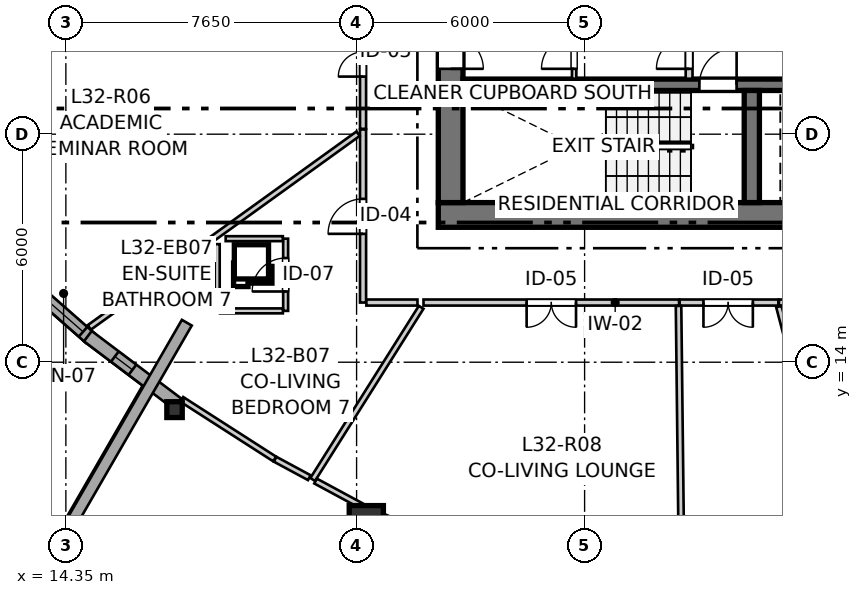
"""IFC4 building model, lengths in metres.
Left out: names, types, materials, properties, quantities, classifications, styles, units other than length and angle.
Written with IfcOpenShell. Run it as: python <this file> out.ifc"""

import sys

from ifc_helpers import new_model, si_unit, direction, frame, frame_2d, origin, origin_2d, place, context, subcontext, project, spatial, rectangle, i_section, extrude, source, transform, mapped, element, fill, save


model = new_model("IFC4")
c1 = context("Model", 3, precision=1e-05, world=origin(), true_north=direction((0.0, 1.0)))
c2 = subcontext(c1, "Body", "Model", "MODEL_VIEW")
j1 = project(units=[si_unit("LENGTHUNIT", "METRE"), si_unit("PLANEANGLEUNIT", "RADIAN")], contexts=[c1])
p1 = place(None, origin())
s1 = spatial("IfcSite", under=j1, at=p1, CompositionType="ELEMENT")
p2 = place(p1, origin())
s2 = spatial("IfcBuilding", under=s1, at=p2, CompositionType="ELEMENT")
p3 = place(p2, frame((0.0, 0.0, 108.8)))
s3 = spatial("IfcBuildingStorey", under=s2, at=p3, CompositionType="ELEMENT", Elevation=108.8)
p4 = place(p3, frame((24.15, 17.875, 0.0), z_axis=(0.0, 0.0, 1.0), x_axis=(1.0, 0.0, 0.0)))
e1 = element("IfcWall", 1, at=p4, inside=s3, PredefinedType="SHEAR", context=c2, shape_type="SweptSolid", body=[
    extrude(rectangle(XDim=12.4, YDim=0.65, at=frame_2d((6.2, 0.0))), origin(), (0.0, 0.0, 1.0), 2.935),
])
p5 = place(p3, frame((24.475, 33.8, 0.0), z_axis=(0.0, 0.0, 1.0), x_axis=(0.0, -1.0, 0.0)))
e2 = element("IfcWall", 2, at=p5, inside=s3, PredefinedType="SHEAR", context=c2, shape_type="SweptSolid", body=[
    extrude(rectangle(XDim=15.6, YDim=0.65, at=frame_2d((7.8, 0.0))), origin(), (0.0, 0.0, 1.0), 2.935),
])
p6 = place(p5, frame((7.05, 0.0, 0.0)))
e3 = element("IfcOpeningElement", 3, at=p6, cuts=e2, PredefinedType="OPENING", context=c2, shape_type="SweptSolid", body=[
    extrude(rectangle(XDim=1.5, YDim=2.15, at=frame_2d((0.75, 1.075))), frame((0.0, 0.335, 0.0), z_axis=(0.0, -1.0, 0.0), x_axis=(1.0, 0.0, 0.0)), (0.0, 0.0, 1.0), 0.67),
])
p7 = place(p5, frame((3.52, 0.0, 0.0)))
e4 = element("IfcOpeningElement", 4, at=p7, cuts=e2, PredefinedType="OPENING", context=c2, shape_type="SweptSolid", body=[
    extrude(rectangle(XDim=0.86, YDim=2.05, at=frame_2d((0.43, 1.025))), frame((0.0, 0.335, 0.0), z_axis=(0.0, -1.0, 0.0), x_axis=(1.0, 0.0, 0.0)), (0.0, 0.0, 1.0), 0.67),
])
p8 = place(p5, frame((11.22, 0.0, 0.0)))
e5 = element("IfcOpeningElement", 5, at=p8, cuts=e2, PredefinedType="OPENING", context=c2, shape_type="SweptSolid", body=[
    extrude(rectangle(XDim=0.86, YDim=2.05, at=frame_2d((0.43, 1.025))), frame((0.0, 0.335, 0.0), z_axis=(0.0, -1.0, 0.0), x_axis=(1.0, 0.0, 0.0)), (0.0, 0.0, 1.0), 0.67),
])
p9 = place(p3, frame((24.8, 21.3, 0.0), z_axis=(0.0, 0.0, 1.0), x_axis=(1.0, 0.0, 0.0)))
e6 = element("IfcWall", 6, at=p9, inside=s3, PredefinedType="SHEAR", context=c2, shape_type="SweptSolid", body=[
    extrude(rectangle(XDim=11.1, YDim=0.3, at=frame_2d((5.55, 0.0))), origin(), (0.0, 0.0, 1.0), 2.935),
])
p10 = place(p9, frame((6.22, 0.0, 0.0)))
e7 = element("IfcOpeningElement", 7, at=p10, cuts=e6, PredefinedType="OPENING", context=c2, shape_type="SweptSolid", body=[
    extrude(rectangle(XDim=0.98, YDim=2.15, at=frame_2d((0.49, 1.075))), frame((0.0, 0.16, 0.0), z_axis=(0.0, -1.0, 0.0), x_axis=(1.0, 0.0, 0.0)), (0.0, 0.0, 1.0), 0.32),
])
p11 = place(p9, frame((9.15, 0.0, 0.0)))
e8 = element("IfcOpeningElement", 8, at=p11, cuts=e6, PredefinedType="OPENING", context=c2, shape_type="SweptSolid", body=[
    extrude(rectangle(XDim=1.15, YDim=2.15, at=frame_2d((0.575, 1.075))), frame((0.0, 0.16, 0.0), z_axis=(0.0, -1.0, 0.0), x_axis=(1.0, 0.0, 0.0)), (0.0, 0.0, 1.0), 0.32),
])
p12 = place(p3, frame((32.4, 18.2, 0.0), z_axis=(0.0, 0.0, 1.0), x_axis=(0.0, 1.0, 0.0)))
e9 = element("IfcWall", 9, at=p12, inside=s3, PredefinedType="SHEAR", context=c2, shape_type="SweptSolid", body=[
    extrude(rectangle(XDim=2.95, YDim=0.4, at=frame_2d((1.475, 0.0))), origin(), (0.0, 0.0, 1.0), 2.935),
])
m1 = source(origin(), c2, "Body", "SweptSolid", [
    extrude(i_section(OverallWidth=0.406, OverallDepth=0.416, WebThickness=0.027, FlangeThickness=0.044, FilletRadius=0.015, at=origin_2d()), origin(), (0.0, 0.0, 1.0), 2.935),
])
p13 = place(p3, frame((17.209, 12.753, 0.0), z_axis=(0.0, 0.0, 1.0), x_axis=(1.0, 0.0, 0.0)))
e10 = element("IfcColumn", 10, at=p13, inside=s3, PredefinedType="PILASTER", context=c2, shape_type="MappedRepresentation", body=[
    mapped(m1, transform((0.0, 0.0, 0.0), x_axis=(1.0, 0.0, 0.0), y_axis=(0.0, 1.0, 0.0), z_axis=(0.0, 0.0, 1.0), scale=1.0)),
])
m2 = source(origin(), c2, "Body", "SweptSolid", [
    extrude(rectangle(XDim=0.9, YDim=0.9, at=origin_2d()), origin(), (0.0, 0.0, 1.0), 2.935),
])
p14 = place(p3, frame((22.256, 9.778, 0.0), z_axis=(0.0, 0.0, 1.0), x_axis=(1.0, 0.0, 0.0)))
e11 = element("IfcColumn", 11, at=p14, inside=s3, PredefinedType="COLUMN", context=c2, shape_type="MappedRepresentation", body=[
    mapped(m2, transform((0.0, 0.0, 0.0), x_axis=(1.0, 0.0, 0.0), y_axis=(0.0, 1.0, 0.0), z_axis=(0.0, 0.0, 1.0), scale=1.0)),
])
p15 = place(p3, frame((12.901, 16.471, 0.0), z_axis=(0.0, 0.0, 1.0), x_axis=(0.751480442913, -0.659755366722, 0.0)))
e12 = element("IfcWall", 12, at=p15, inside=s3, PredefinedType="SOLIDWALL", context=c2, shape_type="SweptSolid", body=[
    extrude(rectangle(XDim=2.789, YDim=0.34, at=frame_2d((1.395, 0.0))), origin(), (0.0, 0.0, 1.0), 2.465),
])
p16 = place(p15, frame((0.43, 0.0, 0.82)))
e13 = element("IfcOpeningElement", 13, at=p16, cuts=e12, PredefinedType="OPENING", context=c2, shape_type="SweptSolid", body=[
    extrude(rectangle(XDim=2.1, YDim=1.4, at=frame_2d((1.05, 0.7))), frame((0.0, 0.18, 0.0), z_axis=(0.0, -1.0, 0.0), x_axis=(1.0, 0.0, 0.0)), (0.0, 0.0, 1.0), 0.36),
])
p17 = place(p3, frame((14.928, 14.686, 0.0), z_axis=(0.0, 0.0, 1.0), x_axis=(0.798387010211, -0.602144651995, 0.0)))
e14 = element("IfcWall", 14, at=p17, inside=s3, PredefinedType="SOLIDWALL", context=c2, shape_type="SweptSolid", body=[
    extrude(rectangle(XDim=2.966, YDim=0.34, at=frame_2d((1.483, 0.0))), origin(), (0.0, 0.0, 1.0), 2.465),
])
p18 = place(p17, frame((0.891, 0.0, 0.82)))
e15 = element("IfcOpeningElement", 15, at=p18, cuts=e14, PredefinedType="OPENING", context=c2, shape_type="SweptSolid", body=[
    extrude(rectangle(XDim=0.58, YDim=1.35, at=frame_2d((0.29, 0.675))), frame((0.0, 0.18, 0.0), z_axis=(0.0, -1.0, 0.0), x_axis=(1.0, 0.0, 0.0)), (0.0, 0.0, 1.0), 0.36),
])
p19 = place(p3, frame((17.533, 15.04, 0.0), z_axis=(0.0, 0.0, 1.0), x_axis=(-0.499995950774, -0.866027741594, 0.0)))
e16 = element("IfcWall", 16, at=p19, inside=s3, PredefinedType="SOLIDWALL", context=c2, shape_type="SweptSolid", body=[
    extrude(rectangle(XDim=20.091, YDim=0.3, at=frame_2d((10.045, 0.0))), origin(), (0.0, 0.0, 1.0), 2.115),
])
p20 = place(p3, frame((30.75, 21.46, 0.0), z_axis=(0.0, 0.0, 1.0), x_axis=(0.0, 1.0, 0.0)))
e17 = element("IfcWall", 17, at=p20, inside=s3, PredefinedType="PARTITIONING", context=c2, shape_type="SweptSolid", body=[
    extrude(rectangle(XDim=3.11, YDim=0.18, at=frame_2d((1.555, 0.0))), origin(), (0.0, 0.0, 1.0), 2.935),
])
p21 = place(p20, frame((0.26, 0.0, 0.0)))
e18 = element("IfcOpeningElement", 18, at=p21, cuts=e17, PredefinedType="OPENING", context=c2, shape_type="SweptSolid", body=[
    extrude(rectangle(XDim=0.86, YDim=2.05, at=frame_2d((0.43, 1.025))), frame((0.0, 0.1, 0.0), z_axis=(0.0, -1.0, 0.0), x_axis=(1.0, 0.0, 0.0)), (0.0, 0.0, 1.0), 0.2),
])
p22 = place(p3, frame((27.725, 21.46, 0.0), z_axis=(0.0, 0.0, 1.0), x_axis=(0.0, 1.0, 0.0)))
e19 = element("IfcWall", 19, at=p22, inside=s3, PredefinedType="PARTITIONING", context=c2, shape_type="SweptSolid", body=[
    extrude(rectangle(XDim=1.38, YDim=0.115, at=frame_2d((0.69, 0.0))), origin(), (0.0, 0.0, 1.0), 2.935),
])
p23 = place(p22, frame((0.26, 0.0, 0.0)))
e20 = element("IfcOpeningElement", 20, at=p23, cuts=e19, PredefinedType="OPENING", context=c2, shape_type="SweptSolid", body=[
    extrude(rectangle(XDim=0.86, YDim=2.05, at=frame_2d((0.43, 1.025))), frame((0.0, 0.067, 0.0), z_axis=(0.0, -1.0, 0.0), x_axis=(1.0, 0.0, 0.0)), (0.0, 0.0, 1.0), 0.135),
])
p24 = place(p3, frame((30.486, 15.57, 0.0), z_axis=(0.0, 0.0, 1.0), x_axis=(-1.0, 0.0, 0.0)))
e21 = element("IfcWall", 21, at=p24, inside=s3, PredefinedType="PARTITIONING", context=c2, shape_type="SweptSolid", body=[
    extrude(rectangle(XDim=6.725, YDim=0.16, at=frame_2d((3.363, 0.0))), origin(), (0.0, 0.0, 1.0), 2.935),
])
p25 = place(p24, frame((2.711, 0.0, 0.0)))
e22 = element("IfcOpeningElement", 22, at=p25, cuts=e21, PredefinedType="OPENING", context=c2, shape_type="SweptSolid", body=[
    extrude(rectangle(XDim=1.3, YDim=2.1, at=frame_2d((0.65, 1.05))), frame((0.0, 0.09, 0.0), z_axis=(0.0, -1.0, 0.0), x_axis=(1.0, 0.0, 0.0)), (0.0, 0.0, 1.0), 0.18),
])
p26 = place(p3, frame((22.17, 15.57, 0.0), z_axis=(0.0, 0.0, 1.0), x_axis=(0.0, 1.0, 0.0)))
e23 = element("IfcWall", 23, at=p26, inside=s3, PredefinedType="PARTITIONING", context=c2, shape_type="SweptSolid", body=[
    extrude(rectangle(XDim=4.555, YDim=0.16, at=frame_2d((2.277, 0.0))), origin(), (0.0, 0.0, 1.0), 2.935),
])
p27 = place(p26, frame((1.808, 0.0, 0.0)))
e24 = element("IfcOpeningElement", 24, at=p27, cuts=e23, PredefinedType="OPENING", context=c2, shape_type="SweptSolid", body=[
    extrude(rectangle(XDim=0.92, YDim=2.1, at=frame_2d((0.46, 1.05))), frame((0.0, 0.09, 0.0), z_axis=(0.0, -1.0, 0.0), x_axis=(1.0, 0.0, 0.0)), (0.0, 0.0, 1.0), 0.18),
])
p28 = place(p3, frame((22.17, 20.14, 0.0), z_axis=(0.0, 0.0, 1.0), x_axis=(0.0, 1.0, 0.0)))
e25 = element("IfcWall", 25, at=p28, inside=s3, PredefinedType="PARTITIONING", context=c2, shape_type="SweptSolid", body=[
    extrude(rectangle(XDim=4.01, YDim=0.16, at=frame_2d((2.005, 0.0))), origin(), (0.0, 0.0, 1.0), 2.935),
])
p29 = place(p28, frame((1.375, 0.0, 0.0)))
e26 = element("IfcOpeningElement", 26, at=p29, cuts=e25, PredefinedType="OPENING", context=c2, shape_type="SweptSolid", body=[
    extrude(rectangle(XDim=1.3, YDim=2.1, at=frame_2d((0.65, 1.05))), frame((0.0, 0.09, 0.0), z_axis=(0.0, -1.0, 0.0), x_axis=(1.0, 0.0, 0.0)), (0.0, 0.0, 1.0), 0.18),
])
p30 = place(p3, frame((25.071, 8.884, 0.0), z_axis=(0.0, 0.0, 1.0), x_axis=(-0.913404708383, 0.407052623997, 0.0)))
e27 = element("IfcWall", 27, at=p30, inside=s3, PredefinedType="PARTITIONING", context=c2, shape_type="SweptSolid", body=[
    extrude(rectangle(XDim=2.923, YDim=0.145, at=frame_2d((1.462, 0.0))), origin(), (0.0, 0.0, 1.0), 2.453),
])
p31 = place(p30, frame((0.22, 0.0, 0.0)))
e28 = element("IfcOpeningElement", 28, at=p31, cuts=e27, PredefinedType="OPENING", context=c2, shape_type="SweptSolid", body=[
    extrude(rectangle(XDim=0.96, YDim=2.1, at=frame_2d((0.48, 1.05))), frame((0.0, 0.083, 0.0), z_axis=(0.0, -1.0, 0.0), x_axis=(1.0, 0.0, 0.0)), (0.0, 0.0, 1.0), 0.165),
])
p32 = place(p3, frame((33.099, 15.57, 0.0), z_axis=(0.0, 0.0, 1.0), x_axis=(-1.0, 0.0, 0.0)))
e29 = element("IfcWall", 29, at=p32, inside=s3, PredefinedType="PARTITIONING", context=c2, shape_type="SweptSolid", body=[
    extrude(rectangle(XDim=2.598, YDim=0.16, at=frame_2d((1.299, 0.0))), origin(), (0.0, 0.0, 1.0), 2.935),
])
p33 = place(p32, frame((0.671, 0.0, 0.0)))
e30 = element("IfcOpeningElement", 30, at=p33, cuts=e29, PredefinedType="OPENING", context=c2, shape_type="SweptSolid", body=[
    extrude(rectangle(XDim=1.3, YDim=2.1, at=frame_2d((0.65, 1.05))), frame((0.0, 0.09, 0.0), z_axis=(0.0, -1.0, 0.0), x_axis=(1.0, 0.0, 0.0)), (0.0, 0.0, 1.0), 0.18),
])
p34 = place(p3, frame((35.536, 15.57, 0.0), z_axis=(0.0, 0.0, 1.0), x_axis=(-1.0, 0.0, 0.0)))
e31 = element("IfcWall", 31, at=p34, inside=s3, PredefinedType="PARTITIONING", context=c2, shape_type="SweptSolid", body=[
    extrude(rectangle(XDim=2.422, YDim=0.16, at=frame_2d((1.211, 0.0))), origin(), (0.0, 0.0, 1.0), 2.935),
])
p35 = place(p34, frame((0.75, 0.0, 0.0)))
e32 = element("IfcOpeningElement", 32, at=p35, cuts=e31, PredefinedType="OPENING", context=c2, shape_type="SweptSolid", body=[
    extrude(rectangle(XDim=0.92, YDim=2.1, at=frame_2d((0.46, 1.05))), frame((0.0, 0.09, 0.0), z_axis=(0.0, -1.0, 0.0), x_axis=(1.0, 0.0, 0.0)), (0.0, 0.0, 1.0), 0.18),
])
p36 = place(p3, frame((20.133, 15.351, 0.0), z_axis=(0.0, 0.0, 1.0), x_axis=(0.0, 1.0, 0.0)))
e33 = element("IfcWall", 33, at=p36, inside=s3, PredefinedType="PARTITIONING", context=c2, shape_type="SweptSolid", body=[
    extrude(rectangle(XDim=1.9, YDim=0.13, at=frame_2d((0.95, 0.0))), origin(), (0.0, 0.0, 1.0), 2.935),
])
p37 = place(p36, frame((0.51, 0.0, 0.0)))
e34 = element("IfcOpeningElement", 34, at=p37, cuts=e33, PredefinedType="OPENING", context=c2, shape_type="SweptSolid", body=[
    extrude(rectangle(XDim=0.88, YDim=2.05, at=frame_2d((0.44, 1.025))), frame((0.0, 0.075, 0.0), z_axis=(0.0, -1.0, 0.0), x_axis=(1.0, 0.0, 0.0)), (0.0, 0.0, 1.0), 0.15),
])
p38 = place(p3, frame((14.966, 14.915, 0.0), z_axis=(0.0, 0.0, 1.0), x_axis=(0.811310715309, 0.584615192434, 0.0)))
e35 = element("IfcWall", 35, at=p38, inside=s3, PredefinedType="PARTITIONING", context=c2, shape_type="SweptSolid", body=[
    extrude(rectangle(XDim=8.72, YDim=0.145, at=frame_2d((4.36, 0.0))), origin(), (0.0, 0.0, 1.0), 2.103),
])
p39 = place(p3, frame((30.472, 15.481, 0.0), z_axis=(0.0, 0.0, 1.0), x_axis=(0.011623708307, -0.999932442421, 0.0)))
e36 = element("IfcWall", 36, at=p39, inside=s3, PredefinedType="PARTITIONING", context=c2, shape_type="SweptSolid", body=[
    extrude(rectangle(XDim=8.317, YDim=0.145, at=frame_2d((4.159, 0.0))), origin(), (0.0, 0.0, 1.0), 2.935),
])
p40 = place(p3, frame((20.845, 10.914, 0.0), z_axis=(0.0, 0.0, 1.0), x_axis=(0.533007953382, 0.846110230189, 0.0)))
e37 = element("IfcWall", 37, at=p40, inside=s3, PredefinedType="PARTITIONING", context=c2, shape_type="SweptSolid", body=[
    extrude(rectangle(XDim=5.354, YDim=0.145, at=frame_2d((2.677, 0.0))), origin(), (0.0, 0.0, 1.0), 2.935),
])
p41 = place(p3, frame((33.112, 15.464, 0.0), z_axis=(0.0, 0.0, 1.0), x_axis=(0.253558008984, -0.967320182814, 0.0)))
e38 = element("IfcWall", 38, at=p41, inside=s3, PredefinedType="PARTITIONING", context=c2, shape_type="SweptSolid", body=[
    extrude(rectangle(XDim=4.382, YDim=0.145, at=frame_2d((2.191, 0.0))), origin(), (0.0, 0.0, 1.0), 2.935),
])
p42 = place(p3, frame((17.398, 13.024, 0.0), z_axis=(0.0, 0.0, 1.0), x_axis=(0.841590343852, -0.540116369994, 0.0)))
e39 = element("IfcWall", 39, at=p42, inside=s3, PredefinedType="PARTITIONING", context=c2, shape_type="SweptSolid", body=[
    extrude(rectangle(XDim=2.906, YDim=0.145, at=frame_2d((1.453, 0.0))), origin(), (0.0, 0.0, 1.0), 2.453),
])
p43 = place(p3, frame((18.333, 15.351, 0.0), z_axis=(0.0, 0.0, 1.0), x_axis=(0.0, 1.0, 0.0)))
e40 = element("IfcWall", 40, at=p43, inside=s3, PredefinedType="PARTITIONING", context=c2, shape_type="SweptSolid", body=[
    extrude(rectangle(XDim=1.756, YDim=0.13, at=frame_2d((0.878, 0.0))), origin(), (0.0, 0.0, 1.0), 2.935),
])
p44 = place(p3, frame((18.555, 17.251, 0.0), z_axis=(0.0, 0.0, 1.0), x_axis=(1.0, 0.0, 0.0)))
e41 = element("IfcWall", 41, at=p44, inside=s3, PredefinedType="PARTITIONING", context=c2, shape_type="SweptSolid", body=[
    extrude(rectangle(XDim=1.505, YDim=0.13, at=frame_2d((0.752, 0.0))), origin(), (0.0, 0.0, 1.0), 2.935),
])
p45 = place(p3, frame((18.406, 15.351, 0.0), z_axis=(0.0, 0.0, 1.0), x_axis=(1.0, 0.0, 0.0)))
e42 = element("IfcWall", 42, at=p45, inside=s3, PredefinedType="PARTITIONING", context=c2, shape_type="SweptSolid", body=[
    extrude(rectangle(XDim=1.654, YDim=0.13, at=frame_2d((0.827, 0.0))), origin(), (0.0, 0.0, 1.0), 2.935),
])
p46 = place(p3, frame((20.92, 10.873, 0.0), z_axis=(0.0, 0.0, 1.0), x_axis=(0.879929881444, -0.475103571595, 0.0)))
e43 = element("IfcWall", 43, at=p46, inside=s3, PredefinedType="PARTITIONING", context=c2, shape_type="SweptSolid", body=[
    extrude(rectangle(XDim=1.667, YDim=0.145, at=frame_2d((0.834, 0.0))), origin(), (0.0, 0.0, 1.0), 2.453),
])
p47 = place(p3, frame((22.258, 15.57, 0.0), z_axis=(0.0, 0.0, 1.0), x_axis=(1.0, 0.0, 0.0)))
e44 = element("IfcWall", 44, at=p47, inside=s3, PredefinedType="PARTITIONING", context=c2, shape_type="SweptSolid", body=[
    extrude(rectangle(XDim=1.344, YDim=0.16, at=frame_2d((0.672, 0.0))), origin(), (0.0, 0.0, 1.0), 2.935),
])
p48 = place(p3, frame((19.857, 11.447, 0.0), z_axis=(0.0, 0.0, 1.0), x_axis=(0.8800411893, -0.474897362738, 0.0)))
e45 = element("IfcWall", 45, at=p48, inside=s3, PredefinedType="PARTITIONING", context=c2, shape_type="SweptSolid", body=[
    extrude(rectangle(XDim=1.022, YDim=0.145, at=frame_2d((0.511, 0.0))), origin(), (0.0, 0.0, 1.0), 2.453),
])
m3 = source(origin(), c2, "Body", "SweptSolid", [
    extrude(rectangle(XDim=2.1, YDim=1.4, at=frame_2d((1.05, 0.7))), frame((0.0, 0.03, 0.0), z_axis=(0.0, -1.0, 0.0), x_axis=(1.0, 0.0, 0.0)), (0.0, 0.0, 1.0), 0.06),
])
p49 = place(p16, origin())
e46 = element("IfcWindow", 46, at=p49, inside=s3, PartitioningType="SINGLE_PANEL", PredefinedType="WINDOW", context=c2, shape_type="MappedRepresentation", body=[
    mapped(m3, transform((0.0, 0.0, 0.0), x_axis=(1.0, 0.0, 0.0), y_axis=(0.0, 1.0, 0.0), z_axis=(0.0, 0.0, 1.0), scale=1.0)),
])
fill(e13, e46)
m4 = source(origin(), c2, "Body", "SweptSolid", [
    extrude(rectangle(XDim=0.58, YDim=1.35, at=frame_2d((0.29, 0.675))), frame((0.0, 0.03, 0.0), z_axis=(0.0, -1.0, 0.0), x_axis=(1.0, 0.0, 0.0)), (0.0, 0.0, 1.0), 0.06),
])
p50 = place(p18, origin())
e47 = element("IfcWindow", 47, at=p50, inside=s3, PartitioningType="SINGLE_PANEL", PredefinedType="WINDOW", context=c2, shape_type="MappedRepresentation", body=[
    mapped(m4, transform((0.0, 0.0, 0.0), x_axis=(1.0, 0.0, 0.0), y_axis=(0.0, 1.0, 0.0), z_axis=(0.0, 0.0, 1.0), scale=1.0)),
])
fill(e15, e47)
m5 = source(origin(), c2, "Body", "SweptSolid", [
    extrude(rectangle(XDim=0.98, YDim=2.15, at=frame_2d((0.49, 1.075))), frame((0.0, 0.025, 0.0), z_axis=(0.0, -1.0, 0.0), x_axis=(1.0, 0.0, 0.0)), (0.0, 0.0, 1.0), 0.05),
])
p51 = place(p10, origin())
e48 = element("IfcDoor", 48, at=p51, inside=s3, OperationType="SINGLE_SWING_RIGHT", PredefinedType="DOOR", context=c2, shape_type="MappedRepresentation", body=[
    mapped(m5, transform((0.0, 0.0, 0.0), x_axis=(1.0, 0.0, 0.0), y_axis=(0.0, 1.0, 0.0), z_axis=(0.0, 0.0, 1.0), scale=1.0)),
])
fill(e7, e48)
m6 = source(origin(), c2, "Body", "SweptSolid", [
    extrude(rectangle(XDim=0.86, YDim=2.05, at=frame_2d((0.43, 1.025))), frame((0.0, 0.025, 0.0), z_axis=(0.0, -1.0, 0.0), x_axis=(1.0, 0.0, 0.0)), (0.0, 0.0, 1.0), 0.05),
])
p52 = place(p8, origin())
e49 = element("IfcDoor", 49, at=p52, inside=s3, OperationType="SINGLE_SWING_RIGHT", PredefinedType="DOOR", context=c2, shape_type="MappedRepresentation", body=[
    mapped(m6, transform((0.0, 0.0, 0.0), x_axis=(1.0, 0.0, 0.0), y_axis=(0.0, 1.0, 0.0), z_axis=(0.0, 0.0, 1.0), scale=1.0)),
])
fill(e5, e49)
p53 = place(p21, origin())
e50 = element("IfcDoor", 50, at=p53, inside=s3, OperationType="SINGLE_SWING_LEFT", PredefinedType="DOOR", context=c2, shape_type="MappedRepresentation", body=[
    mapped(m6, transform((0.0, 0.0, 0.0), x_axis=(1.0, 0.0, 0.0), y_axis=(0.0, 1.0, 0.0), z_axis=(0.0, 0.0, 1.0), scale=1.0)),
])
fill(e18, e50)
p54 = place(p23, origin())
e51 = element("IfcDoor", 51, at=p54, inside=s3, OperationType="SINGLE_SWING_LEFT", PredefinedType="DOOR", context=c2, shape_type="MappedRepresentation", body=[
    mapped(m6, transform((0.0, 0.0, 0.0), x_axis=(1.0, 0.0, 0.0), y_axis=(0.0, 1.0, 0.0), z_axis=(0.0, 0.0, 1.0), scale=1.0)),
])
fill(e20, e51)
m7 = source(origin(), c2, "Body", "SweptSolid", [
    extrude(rectangle(XDim=1.3, YDim=2.1, at=frame_2d((0.65, 1.05))), frame((0.0, 0.025, 0.0), z_axis=(0.0, -1.0, 0.0), x_axis=(1.0, 0.0, 0.0)), (0.0, 0.0, 1.0), 0.05),
])
p55 = place(p25, origin())
e52 = element("IfcDoor", 52, at=p55, inside=s3, OperationType="DOUBLE_DOOR_SINGLE_SWING", PredefinedType="DOOR", context=c2, shape_type="MappedRepresentation", body=[
    mapped(m7, transform((0.0, 0.0, 0.0), x_axis=(1.0, 0.0, 0.0), y_axis=(0.0, 1.0, 0.0), z_axis=(0.0, 0.0, 1.0), scale=1.0)),
])
fill(e22, e52)
m8 = source(origin(), c2, "Body", "SweptSolid", [
    extrude(rectangle(XDim=0.92, YDim=2.1, at=frame_2d((0.46, 1.05))), frame((0.0, 0.025, 0.0), z_axis=(0.0, -1.0, 0.0), x_axis=(1.0, 0.0, 0.0)), (0.0, 0.0, 1.0), 0.05),
])
p56 = place(p27, origin())
e53 = element("IfcDoor", 53, at=p56, inside=s3, OperationType="SINGLE_SWING_LEFT", PredefinedType="DOOR", context=c2, shape_type="MappedRepresentation", body=[
    mapped(m8, transform((0.0, 0.0, 0.0), x_axis=(1.0, 0.0, 0.0), y_axis=(0.0, 1.0, 0.0), z_axis=(0.0, 0.0, 1.0), scale=1.0)),
])
fill(e24, e53)
p57 = place(p29, origin())
e54 = element("IfcDoor", 54, at=p57, inside=s3, OperationType="DOUBLE_DOOR_SINGLE_SWING", PredefinedType="DOOR", context=c2, shape_type="MappedRepresentation", body=[
    mapped(m7, transform((0.0, 0.0, 0.0), x_axis=(1.0, 0.0, 0.0), y_axis=(0.0, 1.0, 0.0), z_axis=(0.0, 0.0, 1.0), scale=1.0)),
])
fill(e26, e54)
p58 = place(p33, origin())
e55 = element("IfcDoor", 55, at=p58, inside=s3, OperationType="DOUBLE_DOOR_SINGLE_SWING", PredefinedType="DOOR", context=c2, shape_type="MappedRepresentation", body=[
    mapped(m7, transform((0.0, 0.0, 0.0), x_axis=(1.0, 0.0, 0.0), y_axis=(0.0, 1.0, 0.0), z_axis=(0.0, 0.0, 1.0), scale=1.0)),
])
fill(e30, e55)
m9 = source(origin(), c2, "Body", "SweptSolid", [
    extrude(rectangle(XDim=0.88, YDim=2.05, at=frame_2d((0.44, 1.025))), frame((0.0, 0.025, 0.0), z_axis=(0.0, -1.0, 0.0), x_axis=(1.0, 0.0, 0.0)), (0.0, 0.0, 1.0), 0.05),
])
p59 = place(p37, origin())
e56 = element("IfcDoor", 56, at=p59, inside=s3, OperationType="SINGLE_SWING_LEFT", PredefinedType="DOOR", context=c2, shape_type="MappedRepresentation", body=[
    mapped(m9, transform((0.0, 0.0, 0.0), x_axis=(1.0, 0.0, 0.0), y_axis=(0.0, 1.0, 0.0), z_axis=(0.0, 0.0, 1.0), scale=1.0)),
])
fill(e34, e56)
save(model, sys.argv[1])
